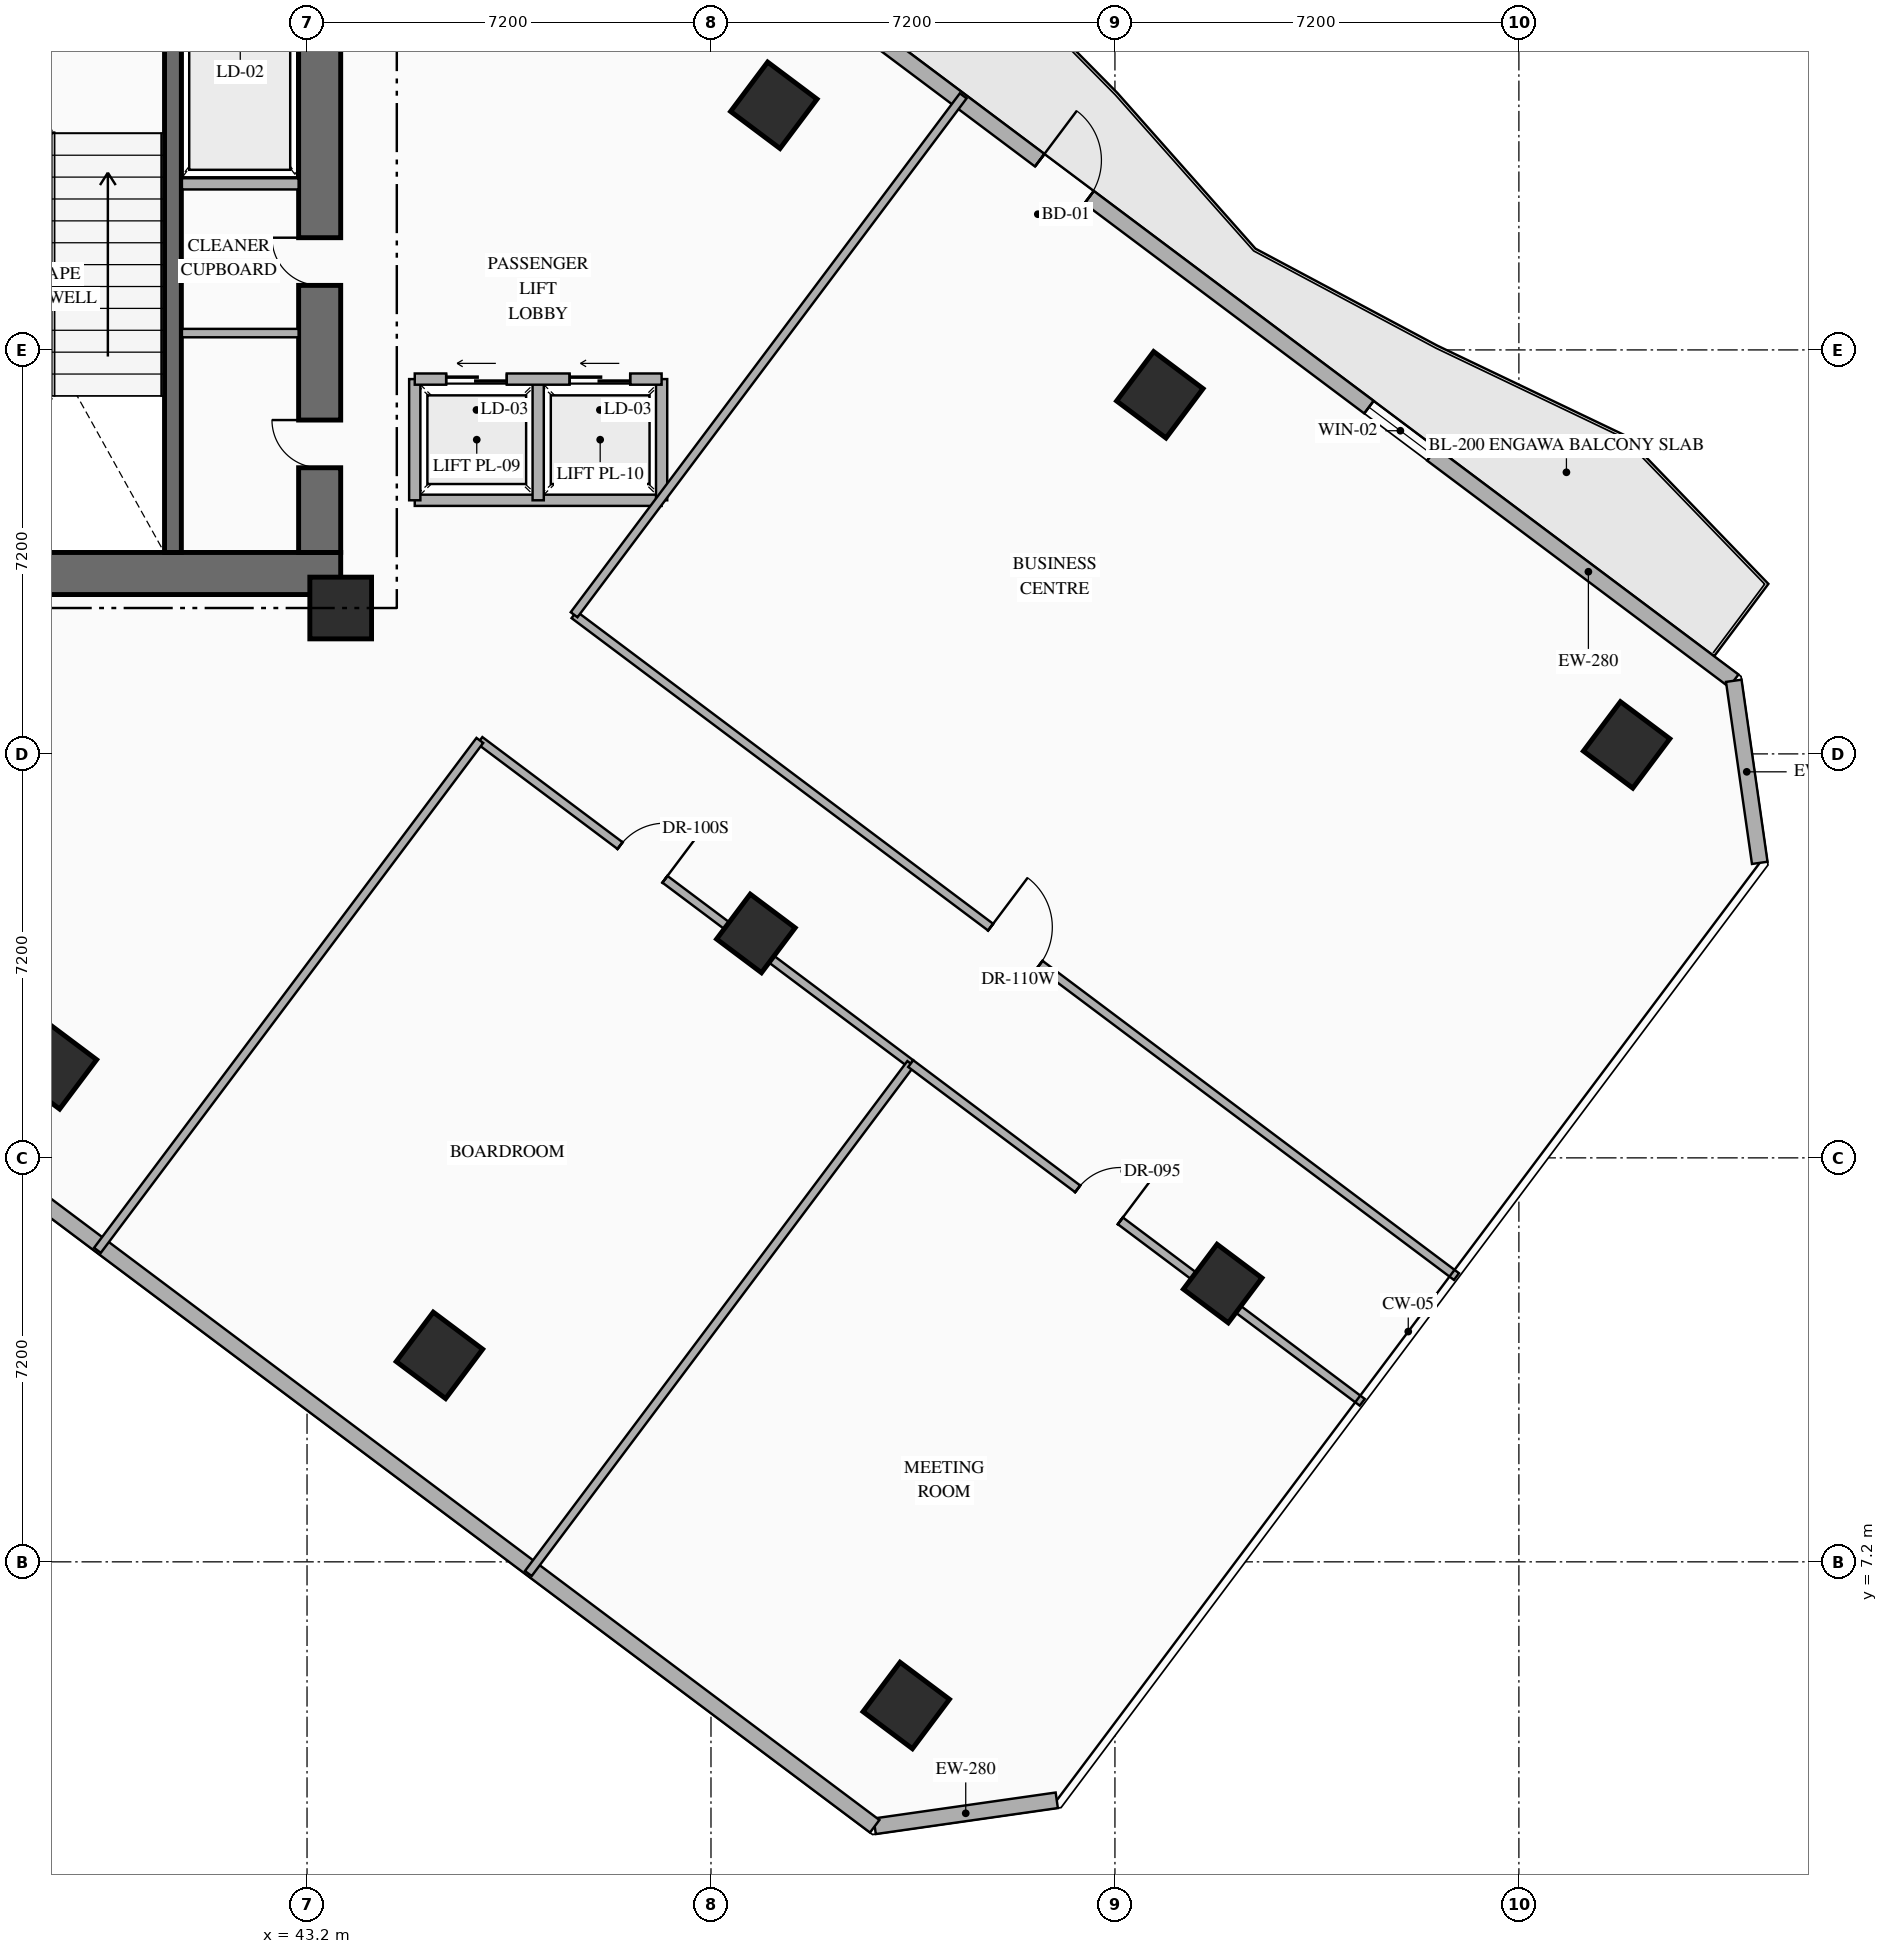
"""IFC4 building model, lengths in metres.
Left out: names, types, materials, properties, quantities, classifications, styles, units other than length and angle.
Written with IfcOpenShell. Run it as: python <this file> out.ifc"""

import sys

from ifc_helpers import new_model, si_unit, direction, frame, frame_2d, origin, origin_2d, place, context, subcontext, project, spatial, rectangle, hollow_rectangle, extrude, element, fill, save


model = new_model("IFC4")
c1 = context("Model", 3, precision=1e-05, world=origin(), true_north=direction((0.0, 1.0)))
c2 = subcontext(c1, "Body", "Model", "MODEL_VIEW")
j1 = project(units=[si_unit("LENGTHUNIT", "METRE"), si_unit("PLANEANGLEUNIT", "RADIAN")], contexts=[c1])
p1 = place(None, origin())
s1 = spatial("IfcSite", under=j1, at=p1, CompositionType="ELEMENT")
p2 = place(p1, origin())
s2 = spatial("IfcBuilding", under=s1, at=p2, CompositionType="ELEMENT")
p3 = place(p2, frame((0.0, 0.0, 32.1)))
s3 = spatial("IfcBuildingStorey", under=s2, at=p3, CompositionType="ELEMENT", Elevation=32.1)
p4 = place(p3, frame((35.74, 24.815, 0.0), z_axis=(0.0, 0.0, 1.0), x_axis=(1.0, 0.0, 0.0)))
e1 = element("IfcWall", 1, at=p4, inside=s3, PredefinedType="SHEAR", context=c2, shape_type="SweptSolid", body=[
    extrude(rectangle(XDim=8.06, YDim=0.75, at=frame_2d((4.03, 0.0))), origin(), (0.0, 0.0, 1.0), 4.5),
])
p5 = place(p3, frame((43.425, 25.19, 0.0), z_axis=(0.0, 0.0, 1.0), x_axis=(0.0, 1.0, 0.0)))
e2 = element("IfcWall", 2, at=p5, inside=s3, PredefinedType="SHEAR", context=c2, shape_type="SweptSolid", body=[
    extrude(rectangle(XDim=9.48, YDim=0.75, at=frame_2d((4.74, 0.0))), origin(), (0.0, 0.0, 1.0), 4.5),
])
p6 = place(p5, frame((1.51, 0.0, 0.0)))
e3 = element("IfcOpeningElement", 3, at=p6, cuts=e2, PredefinedType="OPENING", context=c2, shape_type="SweptSolid", body=[
    extrude(rectangle(XDim=0.85, YDim=2.08, at=frame_2d((0.425, 1.04))), frame((0.0, 0.385, 0.0), z_axis=(0.0, -1.0, 0.0), x_axis=(1.0, 0.0, 0.0)), (0.0, 0.0, 1.0), 0.77),
])
p7 = place(p5, frame((4.76, 0.0, 0.0)))
e4 = element("IfcOpeningElement", 4, at=p7, cuts=e2, PredefinedType="OPENING", context=c2, shape_type="SweptSolid", body=[
    extrude(rectangle(XDim=0.85, YDim=2.08, at=frame_2d((0.425, 1.04))), frame((0.0, 0.385, 0.0), z_axis=(0.0, -1.0, 0.0), x_axis=(1.0, 0.0, 0.0)), (0.0, 0.0, 1.0), 0.77),
])
p8 = place(p3, frame((40.81, 25.19, 0.0), z_axis=(0.0, 0.0, 1.0), x_axis=(0.0, 1.0, 0.0)))
e5 = element("IfcWall", 5, at=p8, inside=s3, PredefinedType="SHEAR", context=c2, shape_type="SweptSolid", body=[
    extrude(rectangle(XDim=9.48, YDim=0.3, at=frame_2d((4.74, 0.0))), origin(), (0.0, 0.0, 1.0), 4.5),
])
p9 = place(p3, frame((43.8, 24.2, 0.0), z_axis=(0.0, 0.0, 1.0), x_axis=(1.0, 0.0, 0.0)))
e6 = element("IfcColumn", 6, at=p9, inside=s3, PredefinedType="COLUMN", context=c2, shape_type="SweptSolid", body=[
    extrude(rectangle(XDim=1.1, YDim=1.1, at=origin_2d()), origin(), (0.0, 0.0, 1.0), 4.5),
])
for number, where, z_axis, x_axis in (
    (7, (38.68, 16.04, 0.0), (0.0, 0.0, 1.0), (0.8, -0.6, 0.0)),
    (8, (51.52, 33.16, 0.0), (0.0, 0.0, 1.0), (0.8, -0.6, 0.0)),
    (9, (45.56, 10.88, 0.0), (0.0, 0.0, 1.0), (0.8, -0.6, 0.0)),
    (10, (58.4, 28.0, 0.0), (0.0, 0.0, 1.0), (0.8, -0.6, 0.0)),
):
    element("IfcColumn", number, at=place(p3, frame(where, z_axis=z_axis, x_axis=x_axis)), inside=s3, PredefinedType="COLUMN", context=c2, shape_type="SweptSolid", body=[
        extrude(hollow_rectangle(XDim=1.1, YDim=1.1, WallThickness=0.04, at=origin_2d()), origin(), (0.0, 0.0, 1.0), 4.5),
    ])
p10 = place(p3, frame((51.2, 18.4, 0.0), z_axis=(0.0, 0.0, 1.0), x_axis=(0.799999996291, -0.600000004945, 0.0)))
e11 = element("IfcColumn", 11, at=p10, inside=s3, PredefinedType="COLUMN", context=c2, shape_type="SweptSolid", body=[
    extrude(hollow_rectangle(XDim=1.0, YDim=1.0, WallThickness=0.038, at=origin_2d()), origin(), (0.0, 0.0, 1.0), 4.5),
])
for number, where, z_axis, x_axis in (
    (12, (53.88, 4.64, 0.0), (0.0, 0.0, 1.0), (0.8, -0.6, 0.0)),
    (13, (66.72, 21.76, 0.0), (0.0, 0.0, 1.0), (0.8, -0.6, 0.0)),
):
    element("IfcColumn", number, at=place(p3, frame(where, z_axis=z_axis, x_axis=x_axis)), inside=s3, PredefinedType="COLUMN", context=c2, shape_type="SweptSolid", body=[
        extrude(hollow_rectangle(XDim=1.1, YDim=1.1, WallThickness=0.04, at=origin_2d()), origin(), (0.0, 0.0, 1.0), 4.5),
    ])
p11 = place(p3, frame((59.52, 12.16, 0.0), z_axis=(0.0, 0.0, 1.0), x_axis=(0.799999996291, -0.600000004945, 0.0)))
e14 = element("IfcColumn", 14, at=p11, inside=s3, PredefinedType="COLUMN", context=c2, shape_type="SweptSolid", body=[
    extrude(hollow_rectangle(XDim=1.0, YDim=1.0, WallThickness=0.038, at=origin_2d()), origin(), (0.0, 0.0, 1.0), 4.5),
])
p12 = place(p3, frame((44.86, 40.73, 0.0), z_axis=(0.0, 0.0, 1.0), x_axis=(0.800006902154, -0.599990797017, 0.0)))
e15 = element("IfcWall", 15, at=p12, inside=s3, PredefinedType="STANDARD", context=c2, shape_type="SweptSolid", body=[
    extrude(rectangle(XDim=29.712, YDim=0.28, at=frame_2d((14.856, 0.0))), origin(), (0.0, 0.0, 1.0), 4.28),
])
p13 = place(p12, frame((14.249, 0.0, 0.0)))
e16 = element("IfcOpeningElement", 16, at=p13, cuts=e15, PredefinedType="OPENING", context=c2, shape_type="SweptSolid", body=[
    extrude(rectangle(XDim=1.1, YDim=2.2, at=frame_2d((0.55, 1.1))), frame((0.0, 0.15, 0.0), z_axis=(0.0, -1.0, 0.0), x_axis=(1.0, 0.0, 0.0)), (0.0, 0.0, 1.0), 0.3),
])
p14 = place(p12, frame((6.728, 0.0, 0.85)))
e17 = element("IfcOpeningElement", 17, at=p14, cuts=e15, PredefinedType="OPENING", context=c2, shape_type="SweptSolid", body=[
    extrude(rectangle(XDim=1.4, YDim=1.8, at=frame_2d((0.7, 0.9))), frame((0.0, 0.15, 0.0), z_axis=(0.0, -1.0, 0.0), x_axis=(1.0, 0.0, 0.0)), (0.0, 0.0, 1.0), 0.3),
])
p15 = place(p12, frame((21.584, 0.0, 0.85)))
e18 = element("IfcOpeningElement", 18, at=p15, cuts=e15, PredefinedType="OPENING", context=c2, shape_type="SweptSolid", body=[
    extrude(rectangle(XDim=1.4, YDim=1.8, at=frame_2d((0.7, 0.9))), frame((0.0, 0.15, 0.0), z_axis=(0.0, -1.0, 0.0), x_axis=(1.0, 0.0, 0.0)), (0.0, 0.0, 1.0), 0.3),
])
p16 = place(p3, frame((68.63, 22.903, 0.0), z_axis=(0.0, 0.0, 1.0), x_axis=(0.141285803956, -0.989968848803, 0.0)))
e19 = element("IfcWall", 19, at=p16, inside=s3, PredefinedType="STANDARD", context=c2, shape_type="SweptSolid", body=[
    extrude(rectangle(XDim=3.278, YDim=0.28, at=frame_2d((1.639, 0.0))), origin(), (0.0, 0.0, 1.0), 4.28),
])
p17 = place(p3, frame((56.563, 2.95, 0.0), z_axis=(0.0, 0.0, 1.0), x_axis=(-0.989977778067, -0.141223223777, 0.0)))
e20 = element("IfcWall", 20, at=p17, inside=s3, PredefinedType="STANDARD", context=c2, shape_type="SweptSolid", body=[
    extrude(rectangle(XDim=3.278, YDim=0.28, at=frame_2d((1.639, 0.0))), origin(), (0.0, 0.0, 1.0), 4.28),
])
p18 = place(p3, frame((53.318, 2.487, 0.0), z_axis=(0.0, 0.0, 1.0), x_axis=(-0.800004174678, 0.599994433723, 0.0)))
e21 = element("IfcWall", 21, at=p18, inside=s3, PredefinedType="STANDARD", context=c2, shape_type="SweptSolid", body=[
    extrude(rectangle(XDim=35.089, YDim=0.28, at=frame_2d((17.544, 0.0))), origin(), (0.0, 0.0, 1.0), 4.28),
])
p19 = place(p3, frame((40.97, 31.76, 0.0), z_axis=(0.0, 0.0, 1.0), x_axis=(1.0, 0.0, 0.0)))
e22 = element("IfcWall", 22, at=p19, inside=s3, PredefinedType="STANDARD", context=c2, shape_type="SweptSolid", body=[
    extrude(rectangle(XDim=2.08, YDim=0.2, at=frame_2d((1.04, 0.0))), origin(), (0.0, 0.0, 1.0), 4.28),
])
p20 = place(p3, frame((40.97, 29.1, 0.0), z_axis=(0.0, 0.0, 1.0), x_axis=(1.0, 0.0, 0.0)))
e23 = element("IfcWall", 23, at=p20, inside=s3, PredefinedType="PARTITIONING", context=c2, shape_type="SweptSolid", body=[
    extrude(rectangle(XDim=2.08, YDim=0.15, at=frame_2d((1.04, 0.0))), origin(), (0.0, 0.0, 1.0), 4.28),
])
p21 = place(p3, frame((45.12, 26.12, 0.0), z_axis=(0.0, 0.0, 1.0), x_axis=(1.0, 0.0, 0.0)))
e24 = element("IfcWall", 24, at=p21, inside=s3, PredefinedType="STANDARD", context=c2, shape_type="SweptSolid", body=[
    extrude(rectangle(XDim=4.4, YDim=0.2, at=frame_2d((2.2, 0.0))), origin(), (0.0, 0.0, 1.0), 4.28),
])
for number, where, z_axis, x_axis in (
    (25, (45.12, 26.12, 0.0), (0.0, 0.0, 1.0), (0.0, 1.0, 0.0)),
    (26, (49.52, 26.12, 0.0), (0.0, 0.0, 1.0), (0.0, 1.0, 0.0)),
    (27, (47.32, 26.12, 0.0), (0.0, 0.0, 1.0), (0.0, 1.0, 0.0)),
):
    element("IfcWall", number, at=place(p3, frame(where, z_axis=z_axis, x_axis=x_axis)), inside=s3, PredefinedType="STANDARD", context=c2, shape_type="SweptSolid", body=[
        extrude(rectangle(XDim=2.16, YDim=0.2, at=frame_2d((1.08, 0.0))), origin(), (0.0, 0.0, 1.0), 4.28),
    ])
p22 = place(p3, frame((45.12, 28.28, 0.0), z_axis=(0.0, 0.0, 1.0), x_axis=(1.0, 0.0, 0.0)))
e28 = element("IfcWall", 28, at=p22, inside=s3, PredefinedType="STANDARD", context=c2, shape_type="SweptSolid", body=[
    extrude(rectangle(XDim=4.4, YDim=0.2, at=frame_2d((2.2, 0.0))), origin(), (0.0, 0.0, 1.0), 4.28),
])
p23 = place(p22, frame((0.56, 0.0, 0.0)))
e29 = element("IfcOpeningElement", 29, at=p23, cuts=e28, PredefinedType="OPENING", context=c2, shape_type="SweptSolid", body=[
    extrude(rectangle(XDim=1.08, YDim=2.15, at=frame_2d((0.54, 1.075))), frame((0.0, 0.11, 0.0), z_axis=(0.0, -1.0, 0.0), x_axis=(1.0, 0.0, 0.0)), (0.0, 0.0, 1.0), 0.22),
])
p24 = place(p22, frame((2.76, 0.0, 0.0)))
e30 = element("IfcOpeningElement", 30, at=p24, cuts=e28, PredefinedType="OPENING", context=c2, shape_type="SweptSolid", body=[
    extrude(rectangle(XDim=1.08, YDim=2.15, at=frame_2d((0.54, 1.075))), frame((0.0, 0.11, 0.0), z_axis=(0.0, -1.0, 0.0), x_axis=(1.0, 0.0, 0.0)), (0.0, 0.0, 1.0), 0.22),
])
p25 = place(p3, frame((47.96, 24.08, 0.0), z_axis=(0.0, 0.0, 1.0), x_axis=(0.799997019653, -0.600003973776, 0.0)))
e31 = element("IfcWall", 31, at=p25, inside=s3, PredefinedType="PARTITIONING", context=c2, shape_type="SweptSolid", body=[
    extrude(rectangle(XDim=19.66, YDim=0.15, at=frame_2d((9.83, 0.0))), origin(), (0.0, 0.0, 1.0), 3.925),
])
p26 = place(p25, frame((9.28, 0.0, 0.0)))
e32 = element("IfcOpeningElement", 32, at=p26, cuts=e31, PredefinedType="OPENING", context=c2, shape_type="SweptSolid", body=[
    extrude(rectangle(XDim=1.1, YDim=2.16, at=frame_2d((0.55, 1.08))), frame((0.0, 0.085, 0.0), z_axis=(0.0, -1.0, 0.0), x_axis=(1.0, 0.0, 0.0)), (0.0, 0.0, 1.0), 0.17),
])
p27 = place(p3, frame((47.96, 24.08, 0.0), z_axis=(0.0, 0.0, 1.0), x_axis=(0.600010137399, 0.799992396851, 0.0)))
e33 = element("IfcWall", 33, at=p27, inside=s3, PredefinedType="PARTITIONING", context=c2, shape_type="SweptSolid", body=[
    extrude(rectangle(XDim=11.56, YDim=0.15, at=frame_2d((5.78, 0.0))), origin(), (0.0, 0.0, 1.0), 4.28),
])
p28 = place(p3, frame((46.28, 21.84, 0.0), z_axis=(0.0, 0.0, 1.0), x_axis=(0.799996948216, -0.600004069023, 0.0)))
e34 = element("IfcWall", 34, at=p28, inside=s3, PredefinedType="PARTITIONING", context=c2, shape_type="SweptSolid", body=[
    extrude(rectangle(XDim=9.6, YDim=0.15, at=frame_2d((4.8, 0.0))), origin(), (0.0, 0.0, 1.0), 3.475),
])
p29 = place(p28, frame((3.124, 0.0, 0.0)))
e35 = element("IfcOpeningElement", 35, at=p29, cuts=e34, PredefinedType="OPENING", context=c2, shape_type="SweptSolid", body=[
    extrude(rectangle(XDim=1.0, YDim=2.15, at=frame_2d((0.5, 1.075))), frame((0.0, 0.085, 0.0), z_axis=(0.0, -1.0, 0.0), x_axis=(1.0, 0.0, 0.0)), (0.0, 0.0, 1.0), 0.17),
])
for number, where, z_axis, x_axis in (
    (36, (39.464, 12.752, 0.0), (0.0, 0.0, 1.0), (0.6, 0.8, 0.0)),
    (37, (47.144, 6.992, 0.0), (0.0, 0.0, 1.0), (0.6, 0.8, 0.0)),
):
    element("IfcWall", number, at=place(p3, frame(where, z_axis=z_axis, x_axis=x_axis)), inside=s3, PredefinedType="PARTITIONING", context=c2, shape_type="SweptSolid", body=[
        extrude(rectangle(XDim=11.36, YDim=0.15, at=frame_2d((5.68, 0.0))), origin(), (0.0, 0.0, 1.0), 4.28),
    ])
p30 = place(p3, frame((53.96, 16.08, 0.0), z_axis=(0.0, 0.0, 1.0), x_axis=(0.799997087822, -0.600003882885, 0.0)))
e38 = element("IfcWall", 38, at=p30, inside=s3, PredefinedType="PARTITIONING", context=c2, shape_type="SweptSolid", body=[
    extrude(rectangle(XDim=10.06, YDim=0.15, at=frame_2d((5.03, 0.0))), origin(), (0.0, 0.0, 1.0), 3.475),
])
p31 = place(p30, frame((3.72, 0.0, 0.0)))
e39 = element("IfcOpeningElement", 39, at=p31, cuts=e38, PredefinedType="OPENING", context=c2, shape_type="SweptSolid", body=[
    extrude(rectangle(XDim=0.95, YDim=2.15, at=frame_2d((0.475, 1.075))), frame((0.0, 0.085, 0.0), z_axis=(0.0, -1.0, 0.0), x_axis=(1.0, 0.0, 0.0)), (0.0, 0.0, 1.0), 0.17),
])
p32 = place(p13, origin())
e40 = element("IfcDoor", 40, at=p32, inside=s3, OperationType="SINGLE_SWING_LEFT", PredefinedType="DOOR", context=c2, shape_type="SweptSolid", body=[
    extrude(rectangle(XDim=1.1, YDim=2.2, at=frame_2d((0.55, 1.1))), frame((0.0, 0.025, 0.0), z_axis=(0.0, -1.0, 0.0), x_axis=(1.0, 0.0, 0.0)), (0.0, 0.0, 1.0), 0.05),
])
fill(e16, e40)
p33 = place(p15, origin())
e41 = element("IfcWindow", 41, at=p33, inside=s3, PartitioningType="SINGLE_PANEL", PredefinedType="WINDOW", context=c2, shape_type="SweptSolid", body=[
    extrude(rectangle(XDim=1.4, YDim=1.8, at=frame_2d((0.7, 0.9))), frame((0.0, 0.03, 0.0), z_axis=(0.0, -1.0, 0.0), x_axis=(1.0, 0.0, 0.0)), (0.0, 0.0, 1.0), 0.06),
])
fill(e18, e41)
p34 = place(p6, origin())
e42 = element("IfcDoor", 42, at=p34, inside=s3, OperationType="SINGLE_SWING_RIGHT", PredefinedType="DOOR", context=c2, shape_type="SweptSolid", body=[
    extrude(rectangle(XDim=0.85, YDim=2.08, at=frame_2d((0.425, 1.04))), frame((0.0, 0.025, 0.0), z_axis=(0.0, -1.0, 0.0), x_axis=(1.0, 0.0, 0.0)), (0.0, 0.0, 1.0), 0.05),
])
fill(e3, e42)
p35 = place(p7, origin())
e43 = element("IfcDoor", 43, at=p35, inside=s3, OperationType="SINGLE_SWING_RIGHT", PredefinedType="DOOR", context=c2, shape_type="SweptSolid", body=[
    extrude(rectangle(XDim=0.85, YDim=2.08, at=frame_2d((0.425, 1.04))), frame((0.0, 0.025, 0.0), z_axis=(0.0, -1.0, 0.0), x_axis=(1.0, 0.0, 0.0)), (0.0, 0.0, 1.0), 0.05),
])
fill(e4, e43)
p36 = place(p23, origin())
e44 = element("IfcDoor", 44, at=p36, inside=s3, OperationType="SLIDING_TO_LEFT", PredefinedType="USERDEFINED", context=c2, shape_type="SweptSolid", body=[
    extrude(rectangle(XDim=1.08, YDim=2.15, at=frame_2d((0.54, 1.075))), frame((0.0, 0.025, 0.0), z_axis=(0.0, -1.0, 0.0), x_axis=(1.0, 0.0, 0.0)), (0.0, 0.0, 1.0), 0.05),
])
fill(e29, e44)
p37 = place(p24, origin())
e45 = element("IfcDoor", 45, at=p37, inside=s3, OperationType="SLIDING_TO_LEFT", PredefinedType="USERDEFINED", context=c2, shape_type="SweptSolid", body=[
    extrude(rectangle(XDim=1.08, YDim=2.15, at=frame_2d((0.54, 1.075))), frame((0.0, 0.025, 0.0), z_axis=(0.0, -1.0, 0.0), x_axis=(1.0, 0.0, 0.0)), (0.0, 0.0, 1.0), 0.05),
])
fill(e30, e45)
p38 = place(p26, origin())
e46 = element("IfcDoor", 46, at=p38, inside=s3, OperationType="SINGLE_SWING_LEFT", PredefinedType="DOOR", context=c2, shape_type="SweptSolid", body=[
    extrude(rectangle(XDim=1.1, YDim=2.16, at=frame_2d((0.55, 1.08))), frame((0.0, 0.025, 0.0), z_axis=(0.0, -1.0, 0.0), x_axis=(1.0, 0.0, 0.0)), (0.0, 0.0, 1.0), 0.05),
])
fill(e32, e46)
p39 = place(p29, origin())
e47 = element("IfcDoor", 47, at=p39, inside=s3, OperationType="SINGLE_SWING_RIGHT", PredefinedType="DOOR", context=c2, shape_type="SweptSolid", body=[
    extrude(rectangle(XDim=1.0, YDim=2.15, at=frame_2d((0.5, 1.075))), frame((0.0, 0.025, 0.0), z_axis=(0.0, -1.0, 0.0), x_axis=(1.0, 0.0, 0.0)), (0.0, 0.0, 1.0), 0.05),
])
fill(e35, e47)
p40 = place(p31, origin())
e48 = element("IfcDoor", 48, at=p40, inside=s3, OperationType="SINGLE_SWING_RIGHT", PredefinedType="DOOR", context=c2, shape_type="SweptSolid", body=[
    extrude(rectangle(XDim=0.95, YDim=2.15, at=frame_2d((0.475, 1.075))), frame((0.0, 0.025, 0.0), z_axis=(0.0, -1.0, 0.0), x_axis=(1.0, 0.0, 0.0)), (0.0, 0.0, 1.0), 0.05),
])
fill(e39, e48)
save(model, sys.argv[1])
